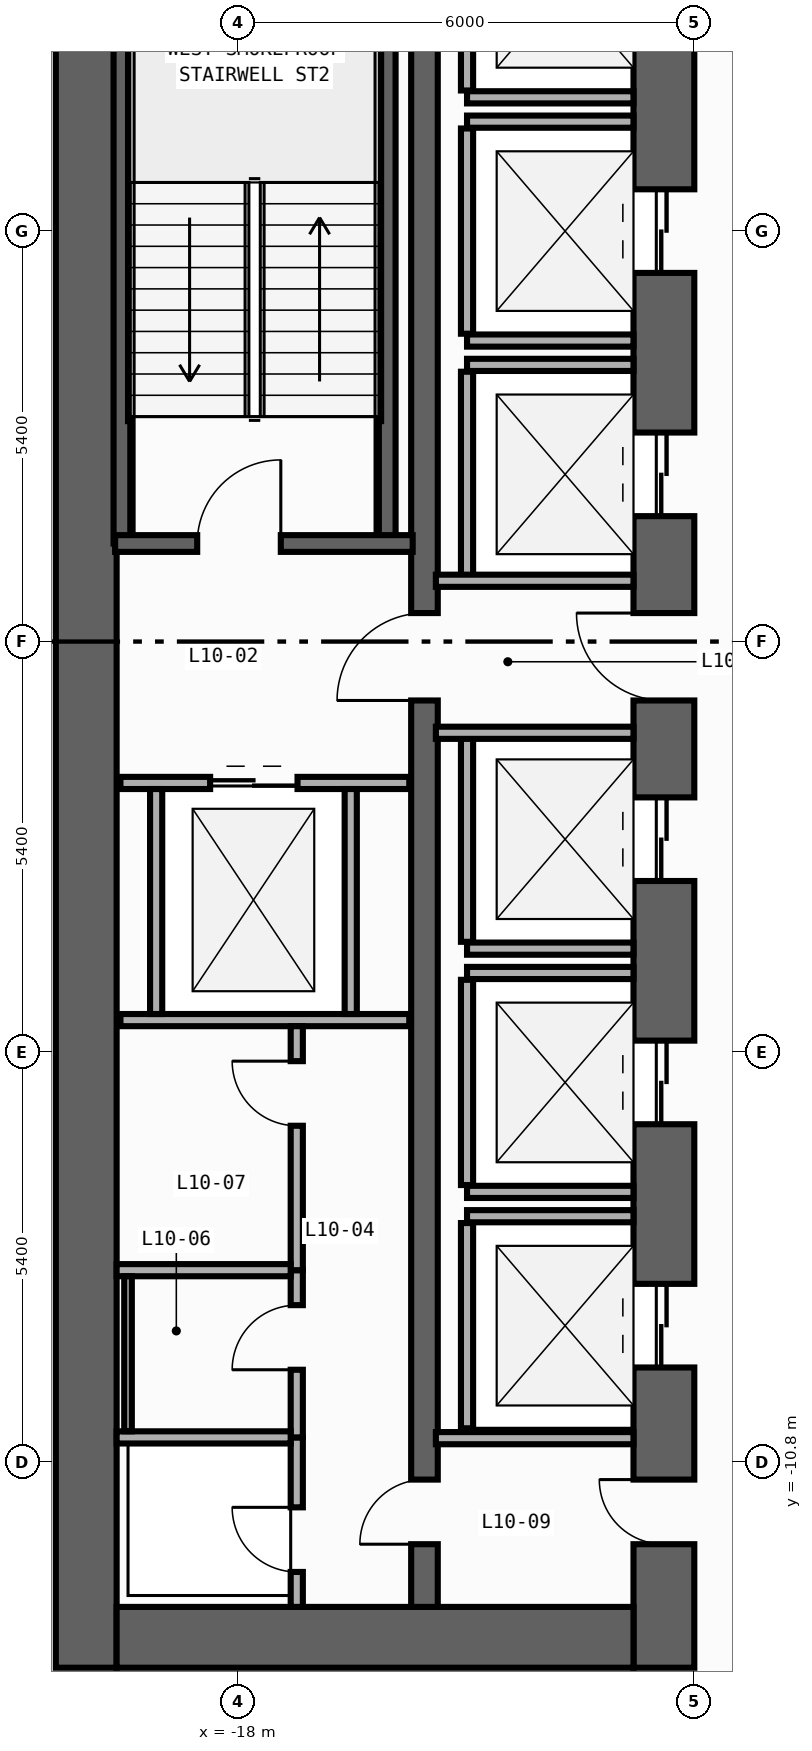
"""IFC4 building model, lengths in metres.
Left out: names, types, materials, properties, quantities, classifications, styles, units other than length and angle.
Written with IfcOpenShell. Run it as: python <this file> out.ifc"""

import sys

from ifc_helpers import new_model, si_unit, direction, frame, frame_2d, origin, place, context, subcontext, project, spatial, rectangle, extrude, element, fill, save


model = new_model("IFC4")
c1 = context("Model", 3, precision=1e-05, world=origin(), true_north=direction((0.0, 1.0)))
c2 = subcontext(c1, "Body", "Model", "MODEL_VIEW")
j1 = project(units=[si_unit("LENGTHUNIT", "METRE"), si_unit("PLANEANGLEUNIT", "RADIAN")], contexts=[c1])
p1 = place(None, origin())
s1 = spatial("IfcSite", under=j1, at=p1, CompositionType="ELEMENT")
p2 = place(p1, origin())
s2 = spatial("IfcBuilding", under=s1, at=p2, CompositionType="ELEMENT")
p3 = place(p2, frame((0.0, 0.0, 42.8)))
s3 = spatial("IfcBuildingStorey", under=s2, at=p3, CompositionType="ELEMENT", Elevation=42.8)
p4 = place(p3, frame((-20.0, -13.5, 0.0), z_axis=(0.0, 0.0, 1.0), x_axis=(0.0, 1.0, 0.0)))
e1 = element("IfcWall", 1, at=p4, inside=s3, PredefinedType="SHEAR", context=c2, shape_type="SweptSolid", body=[
    extrude(rectangle(XDim=27.0, YDim=0.8, at=frame_2d((13.5, 0.0))), origin(), (0.0, 0.0, 1.0), 3.94),
])
p5 = place(p3, frame((-12.4, -13.5, 0.0), z_axis=(0.0, 0.0, 1.0), x_axis=(0.0, 1.0, 0.0)))
e2 = element("IfcWall", 2, at=p5, inside=s3, PredefinedType="SHEAR", context=c2, shape_type="SweptSolid", body=[
    extrude(rectangle(XDim=27.0, YDim=0.8, at=frame_2d((13.5, 0.0))), origin(), (0.0, 0.0, 1.0), 3.94),
])
p6 = place(p5, frame((21.55, 0.0, 0.0)))
e3 = element("IfcOpeningElement", 3, at=p6, cuts=e2, PredefinedType="OPENING", context=c2, shape_type="SweptSolid", body=[
    extrude(rectangle(XDim=1.1, YDim=2.2, at=frame_2d((0.55, 1.1))), frame((0.0, 0.41, 0.0), z_axis=(0.0, -1.0, 0.0), x_axis=(1.0, 0.0, 0.0)), (0.0, 0.0, 1.0), 0.82),
])
p7 = place(p5, frame((18.35, 0.0, 0.0)))
e4 = element("IfcOpeningElement", 4, at=p7, cuts=e2, PredefinedType="OPENING", context=c2, shape_type="SweptSolid", body=[
    extrude(rectangle(XDim=1.1, YDim=2.2, at=frame_2d((0.55, 1.1))), frame((0.0, 0.41, 0.0), z_axis=(0.0, -1.0, 0.0), x_axis=(1.0, 0.0, 0.0)), (0.0, 0.0, 1.0), 0.82),
])
p8 = place(p5, frame((15.15, 0.0, 0.0)))
e5 = element("IfcOpeningElement", 5, at=p8, cuts=e2, PredefinedType="OPENING", context=c2, shape_type="SweptSolid", body=[
    extrude(rectangle(XDim=1.1, YDim=2.2, at=frame_2d((0.55, 1.1))), frame((0.0, 0.41, 0.0), z_axis=(0.0, -1.0, 0.0), x_axis=(1.0, 0.0, 0.0)), (0.0, 0.0, 1.0), 0.82),
])
p9 = place(p5, frame((10.35, 0.0, 0.0)))
e6 = element("IfcOpeningElement", 6, at=p9, cuts=e2, PredefinedType="OPENING", context=c2, shape_type="SweptSolid", body=[
    extrude(rectangle(XDim=1.1, YDim=2.2, at=frame_2d((0.55, 1.1))), frame((0.0, 0.41, 0.0), z_axis=(0.0, -1.0, 0.0), x_axis=(1.0, 0.0, 0.0)), (0.0, 0.0, 1.0), 0.82),
])
p10 = place(p5, frame((7.15, 0.0, 0.0)))
e7 = element("IfcOpeningElement", 7, at=p10, cuts=e2, PredefinedType="OPENING", context=c2, shape_type="SweptSolid", body=[
    extrude(rectangle(XDim=1.1, YDim=2.2, at=frame_2d((0.55, 1.1))), frame((0.0, 0.41, 0.0), z_axis=(0.0, -1.0, 0.0), x_axis=(1.0, 0.0, 0.0)), (0.0, 0.0, 1.0), 0.82),
])
p11 = place(p5, frame((3.95, 0.0, 0.0)))
e8 = element("IfcOpeningElement", 8, at=p11, cuts=e2, PredefinedType="OPENING", context=c2, shape_type="SweptSolid", body=[
    extrude(rectangle(XDim=1.1, YDim=2.2, at=frame_2d((0.55, 1.1))), frame((0.0, 0.41, 0.0), z_axis=(0.0, -1.0, 0.0), x_axis=(1.0, 0.0, 0.0)), (0.0, 0.0, 1.0), 0.82),
])
p12 = place(p5, frame((12.725, 0.0, 0.0)))
e9 = element("IfcOpeningElement", 9, at=p12, cuts=e2, PredefinedType="OPENING", context=c2, shape_type="SweptSolid", body=[
    extrude(rectangle(XDim=1.15, YDim=2.2, at=frame_2d((0.575, 1.1))), frame((0.0, 0.41, 0.0), z_axis=(0.0, -1.0, 0.0), x_axis=(1.0, 0.0, 0.0)), (0.0, 0.0, 1.0), 0.82),
])
p13 = place(p5, frame((1.625, 0.0, 0.0)))
e10 = element("IfcOpeningElement", 10, at=p13, cuts=e2, PredefinedType="OPENING", context=c2, shape_type="SweptSolid", body=[
    extrude(rectangle(XDim=0.85, YDim=2.1, at=frame_2d((0.425, 1.05))), frame((0.0, 0.41, 0.0), z_axis=(0.0, -1.0, 0.0), x_axis=(1.0, 0.0, 0.0)), (0.0, 0.0, 1.0), 0.82),
])
p14 = place(p3, frame((-19.6, -13.1, 0.0), z_axis=(0.0, 0.0, 1.0), x_axis=(1.0, 0.0, 0.0)))
e11 = element("IfcWall", 11, at=p14, inside=s3, PredefinedType="SHEAR", context=c2, shape_type="SweptSolid", body=[
    extrude(rectangle(XDim=6.8, YDim=0.8, at=frame_2d((3.4, 0.0))), origin(), (0.0, 0.0, 1.0), 3.94),
])
p15 = place(p3, frame((-15.55, -12.7, 0.0), z_axis=(0.0, 0.0, 1.0), x_axis=(0.0, 1.0, 0.0)))
e12 = element("IfcWall", 12, at=p15, inside=s3, PredefinedType="SHEAR", context=c2, shape_type="SweptSolid", body=[
    extrude(rectangle(XDim=25.4, YDim=0.35, at=frame_2d((12.7, 0.0))), origin(), (0.0, 0.0, 1.0), 3.94),
])
p16 = place(p15, frame((11.925, 0.0, 0.0)))
e13 = element("IfcOpeningElement", 13, at=p16, cuts=e12, PredefinedType="OPENING", context=c2, shape_type="SweptSolid", body=[
    extrude(rectangle(XDim=1.15, YDim=2.2, at=frame_2d((0.575, 1.1))), frame((0.0, 0.185, 0.0), z_axis=(0.0, -1.0, 0.0), x_axis=(1.0, 0.0, 0.0)), (0.0, 0.0, 1.0), 0.37),
])
p17 = place(p15, frame((0.825, 0.0, 0.0)))
e14 = element("IfcOpeningElement", 14, at=p17, cuts=e12, PredefinedType="OPENING", context=c2, shape_type="SweptSolid", body=[
    extrude(rectangle(XDim=0.85, YDim=2.1, at=frame_2d((0.425, 1.05))), frame((0.0, 0.185, 0.0), z_axis=(0.0, -1.0, 0.0), x_axis=(1.0, 0.0, 0.0)), (0.0, 0.0, 1.0), 0.37),
])
for number, where, z_axis, x_axis in (
    (15, (-16.04, 1.29, 0.0), (0.0, 0.0, 1.0), (0.0, 1.0, 0.0)),
    (16, (-19.53, 1.29, 0.0), (0.0, 0.0, 1.0), (0.0, 1.0, 0.0)),
):
    element("IfcWall", number, at=place(p3, frame(where, z_axis=z_axis, x_axis=x_axis)), inside=s3, PredefinedType="SHEAR", context=c2, shape_type="SweptSolid", body=[
        extrude(rectangle(XDim=11.3, YDim=0.22, at=frame_2d((5.65, 0.0))), origin(), (0.0, 0.0, 1.0), 3.94),
    ])
p18 = place(p3, frame((-19.62, 1.29, 0.0), z_axis=(0.0, 0.0, 1.0), x_axis=(1.0, 0.0, 0.0)))
e17 = element("IfcWall", 17, at=p18, inside=s3, PredefinedType="SHEAR", context=c2, shape_type="SweptSolid", body=[
    extrude(rectangle(XDim=3.915, YDim=0.22, at=frame_2d((1.958, 0.0))), origin(), (0.0, 0.0, 1.0), 3.94),
])
p19 = place(p18, frame((1.08, 0.0, 0.0)))
e18 = element("IfcOpeningElement", 18, at=p19, cuts=e17, PredefinedType="OPENING", context=c2, shape_type="SweptSolid", body=[
    extrude(rectangle(XDim=1.1, YDim=2.2, at=frame_2d((0.55, 1.1))), frame((0.0, 0.12, 0.0), z_axis=(0.0, -1.0, 0.0), x_axis=(1.0, 0.0, 0.0)), (0.0, 0.0, 1.0), 0.24),
])
p20 = place(p3, frame((-14.99, 7.16, 0.0), z_axis=(0.0, 0.0, 1.0), x_axis=(1.0, 0.0, 0.0)))
e19 = element("IfcWall", 19, at=p20, inside=s3, PredefinedType="STANDARD", context=c2, shape_type="SweptSolid", body=[
    extrude(rectangle(XDim=2.19, YDim=0.16, at=frame_2d((1.095, 0.0))), origin(), (0.0, 0.0, 1.0), 3.94),
])
p21 = place(p3, frame((-14.99, 7.25, 0.0), z_axis=(0.0, 0.0, 1.0), x_axis=(0.0, 1.0, 0.0)))
e20 = element("IfcWall", 20, at=p21, inside=s3, PredefinedType="STANDARD", context=c2, shape_type="SweptSolid", body=[
    extrude(rectangle(XDim=2.7, YDim=0.16, at=frame_2d((1.35, 0.0))), origin(), (0.0, 0.0, 1.0), 3.94),
])
for number, where, z_axis, x_axis in (
    (21, (-14.99, 3.96, 0.0), (0.0, 0.0, 1.0), (1.0, 0.0, 0.0)),
    (22, (-14.99, 6.84, 0.0), (0.0, 0.0, 1.0), (1.0, 0.0, 0.0)),
):
    element("IfcWall", number, at=place(p3, frame(where, z_axis=z_axis, x_axis=x_axis)), inside=s3, PredefinedType="STANDARD", context=c2, shape_type="SweptSolid", body=[
        extrude(rectangle(XDim=2.19, YDim=0.16, at=frame_2d((1.095, 0.0))), origin(), (0.0, 0.0, 1.0), 3.94),
    ])
p22 = place(p3, frame((-14.99, 4.05, 0.0), z_axis=(0.0, 0.0, 1.0), x_axis=(0.0, 1.0, 0.0)))
e23 = element("IfcWall", 23, at=p22, inside=s3, PredefinedType="STANDARD", context=c2, shape_type="SweptSolid", body=[
    extrude(rectangle(XDim=2.7, YDim=0.16, at=frame_2d((1.35, 0.0))), origin(), (0.0, 0.0, 1.0), 3.94),
])
p23 = place(p3, frame((-14.99, 3.64, 0.0), z_axis=(0.0, 0.0, 1.0), x_axis=(1.0, 0.0, 0.0)))
e24 = element("IfcWall", 24, at=p23, inside=s3, PredefinedType="STANDARD", context=c2, shape_type="SweptSolid", body=[
    extrude(rectangle(XDim=2.19, YDim=0.16, at=frame_2d((1.095, 0.0))), origin(), (0.0, 0.0, 1.0), 3.94),
])
p24 = place(p3, frame((-14.99, 0.85, 0.0), z_axis=(0.0, 0.0, 1.0), x_axis=(0.0, 1.0, 0.0)))
e25 = element("IfcWall", 25, at=p24, inside=s3, PredefinedType="STANDARD", context=c2, shape_type="SweptSolid", body=[
    extrude(rectangle(XDim=2.7, YDim=0.16, at=frame_2d((1.35, 0.0))), origin(), (0.0, 0.0, 1.0), 3.94),
])
p25 = place(p3, frame((-14.99, -4.04, 0.0), z_axis=(0.0, 0.0, 1.0), x_axis=(1.0, 0.0, 0.0)))
e26 = element("IfcWall", 26, at=p25, inside=s3, PredefinedType="STANDARD", context=c2, shape_type="SweptSolid", body=[
    extrude(rectangle(XDim=2.19, YDim=0.16, at=frame_2d((1.095, 0.0))), origin(), (0.0, 0.0, 1.0), 3.94),
])
p26 = place(p3, frame((-14.99, -3.95, 0.0), z_axis=(0.0, 0.0, 1.0), x_axis=(0.0, 1.0, 0.0)))
e27 = element("IfcWall", 27, at=p26, inside=s3, PredefinedType="STANDARD", context=c2, shape_type="SweptSolid", body=[
    extrude(rectangle(XDim=2.7, YDim=0.16, at=frame_2d((1.35, 0.0))), origin(), (0.0, 0.0, 1.0), 3.94),
])
for number, where, z_axis, x_axis in (
    (28, (-14.99, -7.24, 0.0), (0.0, 0.0, 1.0), (1.0, 0.0, 0.0)),
    (29, (-14.99, -4.36, 0.0), (0.0, 0.0, 1.0), (1.0, 0.0, 0.0)),
):
    element("IfcWall", number, at=place(p3, frame(where, z_axis=z_axis, x_axis=x_axis)), inside=s3, PredefinedType="STANDARD", context=c2, shape_type="SweptSolid", body=[
        extrude(rectangle(XDim=2.19, YDim=0.16, at=frame_2d((1.095, 0.0))), origin(), (0.0, 0.0, 1.0), 3.94),
    ])
p27 = place(p3, frame((-14.99, -7.15, 0.0), z_axis=(0.0, 0.0, 1.0), x_axis=(0.0, 1.0, 0.0)))
e30 = element("IfcWall", 30, at=p27, inside=s3, PredefinedType="STANDARD", context=c2, shape_type="SweptSolid", body=[
    extrude(rectangle(XDim=2.7, YDim=0.16, at=frame_2d((1.35, 0.0))), origin(), (0.0, 0.0, 1.0), 3.94),
])
p28 = place(p3, frame((-14.99, -7.56, 0.0), z_axis=(0.0, 0.0, 1.0), x_axis=(1.0, 0.0, 0.0)))
e31 = element("IfcWall", 31, at=p28, inside=s3, PredefinedType="STANDARD", context=c2, shape_type="SweptSolid", body=[
    extrude(rectangle(XDim=2.19, YDim=0.16, at=frame_2d((1.095, 0.0))), origin(), (0.0, 0.0, 1.0), 3.94),
])
p29 = place(p3, frame((-14.99, -10.35, 0.0), z_axis=(0.0, 0.0, 1.0), x_axis=(0.0, 1.0, 0.0)))
e32 = element("IfcWall", 32, at=p29, inside=s3, PredefinedType="STANDARD", context=c2, shape_type="SweptSolid", body=[
    extrude(rectangle(XDim=2.7, YDim=0.16, at=frame_2d((1.35, 0.0))), origin(), (0.0, 0.0, 1.0), 3.94),
])
p30 = place(p3, frame((-19.55, -1.86, 0.0), z_axis=(0.0, 0.0, 1.0), x_axis=(1.0, 0.0, 0.0)))
e33 = element("IfcWall", 33, at=p30, inside=s3, PredefinedType="STANDARD", context=c2, shape_type="SweptSolid", body=[
    extrude(rectangle(XDim=3.8, YDim=0.16, at=frame_2d((1.9, 0.0))), origin(), (0.0, 0.0, 1.0), 3.94),
])
p31 = place(p30, frame((1.18, 0.0, 0.0)))
e34 = element("IfcOpeningElement", 34, at=p31, cuts=e33, PredefinedType="OPENING", context=c2, shape_type="SweptSolid", body=[
    extrude(rectangle(XDim=1.15, YDim=2.2, at=frame_2d((0.575, 1.1))), frame((0.0, 0.09, 0.0), z_axis=(0.0, -1.0, 0.0), x_axis=(1.0, 0.0, 0.0)), (0.0, 0.0, 1.0), 0.18),
])
p32 = place(p3, frame((-19.55, -4.98, 0.0), z_axis=(0.0, 0.0, 1.0), x_axis=(1.0, 0.0, 0.0)))
e35 = element("IfcWall", 35, at=p32, inside=s3, PredefinedType="STANDARD", context=c2, shape_type="SweptSolid", body=[
    extrude(rectangle(XDim=3.8, YDim=0.16, at=frame_2d((1.9, 0.0))), origin(), (0.0, 0.0, 1.0), 3.94),
])
for number, where, z_axis, x_axis in (
    (36, (-19.08, -4.9, 0.0), (0.0, 0.0, 1.0), (0.0, 1.0, 0.0)),
    (37, (-16.52, -4.9, 0.0), (0.0, 0.0, 1.0), (0.0, 1.0, 0.0)),
):
    element("IfcWall", number, at=place(p3, frame(where, z_axis=z_axis, x_axis=x_axis)), inside=s3, PredefinedType="STANDARD", context=c2, shape_type="SweptSolid", body=[
        extrude(rectangle(XDim=2.96, YDim=0.16, at=frame_2d((1.48, 0.0))), origin(), (0.0, 0.0, 1.0), 3.94),
    ])
for number, where, z_axis, x_axis in (
    (38, (-15.4, 0.8, 0.0), (0.0, 0.0, 1.0), (1.0, 0.0, 0.0)),
    (39, (-15.4, -1.2, 0.0), (0.0, 0.0, 1.0), (1.0, 0.0, 0.0)),
    (40, (-15.4, -10.48, 0.0), (0.0, 0.0, 1.0), (1.0, 0.0, 0.0)),
):
    element("IfcWall", number, at=place(p3, frame(where, z_axis=z_axis, x_axis=x_axis)), inside=s3, PredefinedType="STANDARD", context=c2, shape_type="SweptSolid", body=[
        extrude(rectangle(XDim=2.6, YDim=0.16, at=frame_2d((1.3, 0.0))), origin(), (0.0, 0.0, 1.0), 3.94),
    ])
p33 = place(p3, frame((-17.23, -12.7, 0.0), z_axis=(0.0, 0.0, 1.0), x_axis=(0.0, 1.0, 0.0)))
e41 = element("IfcWall", 41, at=p33, inside=s3, PredefinedType="PARTITIONING", context=c2, shape_type="SweptSolid", body=[
    extrude(rectangle(XDim=2.23, YDim=0.16, at=frame_2d((1.115, 0.0))), origin(), (0.0, 0.0, 1.0), 3.94),
])
p34 = place(p33, frame((0.46, 0.0, 0.0)))
e42 = element("IfcOpeningElement", 42, at=p34, cuts=e41, PredefinedType="OPENING", context=c2, shape_type="SweptSolid", body=[
    extrude(rectangle(XDim=0.85, YDim=2.1, at=frame_2d((0.425, 1.05))), frame((0.0, 0.09, 0.0), z_axis=(0.0, -1.0, 0.0), x_axis=(1.0, 0.0, 0.0)), (0.0, 0.0, 1.0), 0.18),
])
p35 = place(p3, frame((-17.23, -10.47, 0.0), z_axis=(0.0, 0.0, 1.0), x_axis=(0.0, 1.0, 0.0)))
e43 = element("IfcWall", 43, at=p35, inside=s3, PredefinedType="PARTITIONING", context=c2, shape_type="SweptSolid", body=[
    extrude(rectangle(XDim=2.2, YDim=0.16, at=frame_2d((1.1, 0.0))), origin(), (0.0, 0.0, 1.0), 3.94),
])
p36 = place(p35, frame((0.89, 0.0, 0.0)))
e44 = element("IfcOpeningElement", 44, at=p36, cuts=e43, PredefinedType="OPENING", context=c2, shape_type="SweptSolid", body=[
    extrude(rectangle(XDim=0.85, YDim=2.1, at=frame_2d((0.425, 1.05))), frame((0.0, 0.09, 0.0), z_axis=(0.0, -1.0, 0.0), x_axis=(1.0, 0.0, 0.0)), (0.0, 0.0, 1.0), 0.18),
])
p37 = place(p3, frame((-17.23, -8.27, 0.0), z_axis=(0.0, 0.0, 1.0), x_axis=(0.0, 1.0, 0.0)))
e45 = element("IfcWall", 45, at=p37, inside=s3, PredefinedType="PARTITIONING", context=c2, shape_type="SweptSolid", body=[
    extrude(rectangle(XDim=3.21, YDim=0.16, at=frame_2d((1.605, 0.0))), origin(), (0.0, 0.0, 1.0), 3.94),
])
p38 = place(p37, frame((1.9, 0.0, 0.0)))
e46 = element("IfcOpeningElement", 46, at=p38, cuts=e45, PredefinedType="OPENING", context=c2, shape_type="SweptSolid", body=[
    extrude(rectangle(XDim=0.85, YDim=2.1, at=frame_2d((0.425, 1.05))), frame((0.0, 0.09, 0.0), z_axis=(0.0, -1.0, 0.0), x_axis=(1.0, 0.0, 0.0)), (0.0, 0.0, 1.0), 0.18),
])
for number, where, z_axis, x_axis in (
    (47, (-19.6, -10.47, 0.0), (0.0, 0.0, 1.0), (1.0, 0.0, 0.0)),
    (48, (-19.6, -8.27, 0.0), (0.0, 0.0, 1.0), (1.0, 0.0, 0.0)),
):
    element("IfcWall", number, at=place(p3, frame(where, z_axis=z_axis, x_axis=x_axis)), inside=s3, PredefinedType="PARTITIONING", context=c2, shape_type="SweptSolid", body=[
        extrude(rectangle(XDim=2.29, YDim=0.16, at=frame_2d((1.145, 0.0))), origin(), (0.0, 0.0, 1.0), 3.94),
    ])
p39 = place(p3, frame((-19.45, -10.39, 0.0), z_axis=(0.0, 0.0, 1.0), x_axis=(0.0, 1.0, 0.0)))
e49 = element("IfcWall", 49, at=p39, inside=s3, PredefinedType="PARTITIONING", context=c2, shape_type="SweptSolid", body=[
    extrude(rectangle(XDim=2.04, YDim=0.1, at=frame_2d((1.02, 0.0))), origin(), (0.0, 0.0, 1.0), 3.94),
])
p40 = place(p19, origin())
e50 = element("IfcDoor", 50, at=p40, inside=s3, OperationType="SINGLE_SWING_RIGHT", PredefinedType="DOOR", context=c2, shape_type="SweptSolid", body=[
    extrude(rectangle(XDim=1.1, YDim=2.2, at=frame_2d((0.55, 1.1))), frame((0.0, 0.025, 0.0), z_axis=(0.0, -1.0, 0.0), x_axis=(1.0, 0.0, 0.0)), (0.0, 0.0, 1.0), 0.05),
])
fill(e18, e50)
p41 = place(p7, origin())
e51 = element("IfcDoor", 51, at=p41, inside=s3, OperationType="DOUBLE_DOOR_SLIDING", PredefinedType="DOOR", context=c2, shape_type="SweptSolid", body=[
    extrude(rectangle(XDim=1.1, YDim=2.2, at=frame_2d((0.55, 1.1))), frame((0.0, 0.025, 0.0), z_axis=(0.0, -1.0, 0.0), x_axis=(1.0, 0.0, 0.0)), (0.0, 0.0, 1.0), 0.05),
])
fill(e4, e51)
p42 = place(p8, origin())
e52 = element("IfcDoor", 52, at=p42, inside=s3, OperationType="DOUBLE_DOOR_SLIDING", PredefinedType="DOOR", context=c2, shape_type="SweptSolid", body=[
    extrude(rectangle(XDim=1.1, YDim=2.2, at=frame_2d((0.55, 1.1))), frame((0.0, 0.025, 0.0), z_axis=(0.0, -1.0, 0.0), x_axis=(1.0, 0.0, 0.0)), (0.0, 0.0, 1.0), 0.05),
])
fill(e5, e52)
p43 = place(p9, origin())
e53 = element("IfcDoor", 53, at=p43, inside=s3, OperationType="DOUBLE_DOOR_SLIDING", PredefinedType="DOOR", context=c2, shape_type="SweptSolid", body=[
    extrude(rectangle(XDim=1.1, YDim=2.2, at=frame_2d((0.55, 1.1))), frame((0.0, 0.025, 0.0), z_axis=(0.0, -1.0, 0.0), x_axis=(1.0, 0.0, 0.0)), (0.0, 0.0, 1.0), 0.05),
])
fill(e6, e53)
p44 = place(p10, origin())
e54 = element("IfcDoor", 54, at=p44, inside=s3, OperationType="DOUBLE_DOOR_SLIDING", PredefinedType="DOOR", context=c2, shape_type="SweptSolid", body=[
    extrude(rectangle(XDim=1.1, YDim=2.2, at=frame_2d((0.55, 1.1))), frame((0.0, 0.025, 0.0), z_axis=(0.0, -1.0, 0.0), x_axis=(1.0, 0.0, 0.0)), (0.0, 0.0, 1.0), 0.05),
])
fill(e7, e54)
p45 = place(p11, origin())
e55 = element("IfcDoor", 55, at=p45, inside=s3, OperationType="DOUBLE_DOOR_SLIDING", PredefinedType="DOOR", context=c2, shape_type="SweptSolid", body=[
    extrude(rectangle(XDim=1.1, YDim=2.2, at=frame_2d((0.55, 1.1))), frame((0.0, 0.025, 0.0), z_axis=(0.0, -1.0, 0.0), x_axis=(1.0, 0.0, 0.0)), (0.0, 0.0, 1.0), 0.05),
])
fill(e8, e55)
p46 = place(p12, origin())
e56 = element("IfcDoor", 56, at=p46, inside=s3, OperationType="SINGLE_SWING_RIGHT", PredefinedType="DOOR", context=c2, shape_type="SweptSolid", body=[
    extrude(rectangle(XDim=1.15, YDim=2.2, at=frame_2d((0.575, 1.1))), frame((0.0, 0.025, 0.0), z_axis=(0.0, -1.0, 0.0), x_axis=(1.0, 0.0, 0.0)), (0.0, 0.0, 1.0), 0.05),
])
fill(e9, e56)
p47 = place(p16, origin())
e57 = element("IfcDoor", 57, at=p47, inside=s3, OperationType="SINGLE_SWING_LEFT", PredefinedType="DOOR", context=c2, shape_type="SweptSolid", body=[
    extrude(rectangle(XDim=1.15, YDim=2.2, at=frame_2d((0.575, 1.1))), frame((0.0, 0.025, 0.0), z_axis=(0.0, -1.0, 0.0), x_axis=(1.0, 0.0, 0.0)), (0.0, 0.0, 1.0), 0.05),
])
fill(e13, e57)
p48 = place(p13, origin())
e58 = element("IfcDoor", 58, at=p48, inside=s3, OperationType="SINGLE_SWING_RIGHT", PredefinedType="DOOR", context=c2, shape_type="SweptSolid", body=[
    extrude(rectangle(XDim=0.85, YDim=2.1, at=frame_2d((0.425, 1.05))), frame((0.0, 0.025, 0.0), z_axis=(0.0, -1.0, 0.0), x_axis=(1.0, 0.0, 0.0)), (0.0, 0.0, 1.0), 0.05),
])
fill(e10, e58)
p49 = place(p17, origin())
e59 = element("IfcDoor", 59, at=p49, inside=s3, OperationType="SINGLE_SWING_LEFT", PredefinedType="DOOR", context=c2, shape_type="SweptSolid", body=[
    extrude(rectangle(XDim=0.85, YDim=2.1, at=frame_2d((0.425, 1.05))), frame((0.0, 0.025, 0.0), z_axis=(0.0, -1.0, 0.0), x_axis=(1.0, 0.0, 0.0)), (0.0, 0.0, 1.0), 0.05),
])
fill(e14, e59)
p50 = place(p31, origin())
e60 = element("IfcDoor", 60, at=p50, inside=s3, OperationType="DOUBLE_DOOR_SLIDING", PredefinedType="DOOR", context=c2, shape_type="SweptSolid", body=[
    extrude(rectangle(XDim=1.15, YDim=2.2, at=frame_2d((0.575, 1.1))), frame((0.0, 0.025, 0.0), z_axis=(0.0, -1.0, 0.0), x_axis=(1.0, 0.0, 0.0)), (0.0, 0.0, 1.0), 0.05),
])
fill(e34, e60)
p51 = place(p34, origin())
e61 = element("IfcDoor", 61, at=p51, inside=s3, OperationType="SINGLE_SWING_RIGHT", PredefinedType="DOOR", context=c2, shape_type="SweptSolid", body=[
    extrude(rectangle(XDim=0.85, YDim=2.1, at=frame_2d((0.425, 1.05))), frame((0.0, 0.025, 0.0), z_axis=(0.0, -1.0, 0.0), x_axis=(1.0, 0.0, 0.0)), (0.0, 0.0, 1.0), 0.05),
])
fill(e42, e61)
p52 = place(p36, origin())
e62 = element("IfcDoor", 62, at=p52, inside=s3, OperationType="SINGLE_SWING_LEFT", PredefinedType="DOOR", context=c2, shape_type="SweptSolid", body=[
    extrude(rectangle(XDim=0.85, YDim=2.1, at=frame_2d((0.425, 1.05))), frame((0.0, 0.025, 0.0), z_axis=(0.0, -1.0, 0.0), x_axis=(1.0, 0.0, 0.0)), (0.0, 0.0, 1.0), 0.05),
])
fill(e44, e62)
p53 = place(p38, origin())
e63 = element("IfcDoor", 63, at=p53, inside=s3, OperationType="SINGLE_SWING_RIGHT", PredefinedType="DOOR", context=c2, shape_type="SweptSolid", body=[
    extrude(rectangle(XDim=0.85, YDim=2.1, at=frame_2d((0.425, 1.05))), frame((0.0, 0.025, 0.0), z_axis=(0.0, -1.0, 0.0), x_axis=(1.0, 0.0, 0.0)), (0.0, 0.0, 1.0), 0.05),
])
fill(e46, e63)
save(model, sys.argv[1])
